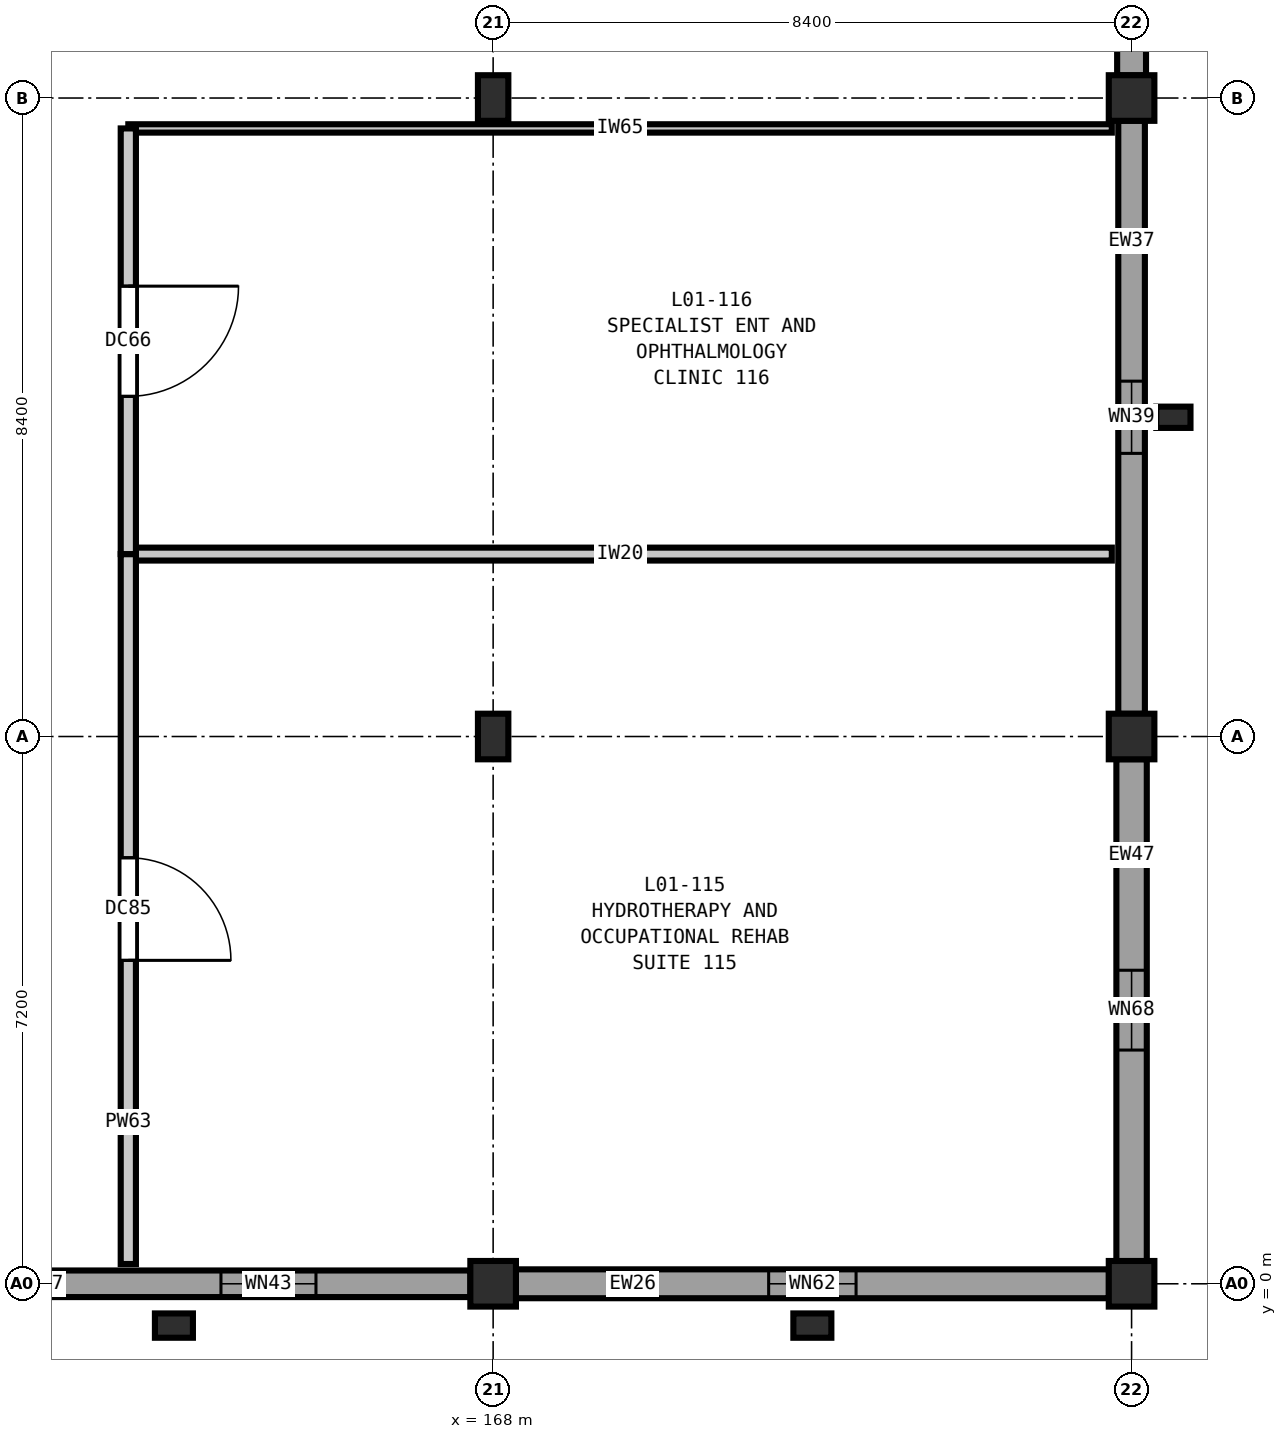
"""IFC4 building model, lengths in metres.
Left out: names, types, materials, properties, quantities, classifications, styles, units other than length and angle.
Written with IfcOpenShell. Run it as: python <this file> out.ifc"""

import sys

from ifc_helpers import new_model, si_unit, direction, frame, frame_2d, origin, origin_2d, place, context, subcontext, project, spatial, rectangle, extrude, element, fill, save


model = new_model("IFC4")
c1 = context("Model", 3, precision=1e-05, world=origin(), true_north=direction((0.0, 1.0)))
c2 = subcontext(c1, "Body", "Model", "MODEL_VIEW")
j1 = project(units=[si_unit("LENGTHUNIT", "METRE"), si_unit("PLANEANGLEUNIT", "RADIAN")], contexts=[c1])
p1 = place(None, origin())
s1 = spatial("IfcSite", under=j1, at=p1, CompositionType="ELEMENT")
p2 = place(p1, origin())
s2 = spatial("IfcBuilding", under=s1, at=p2, CompositionType="ELEMENT")
p3 = place(p2, frame((0.0, 0.0, 5.4)))
s3 = spatial("IfcBuildingStorey", under=s2, at=p3, CompositionType="ELEMENT", Elevation=5.4)
p4 = place(p3, frame((168.0, 0.0, 0.0), z_axis=(0.0, 0.0, 1.0), x_axis=(1.0, 0.0, 0.0)))
e1 = element("IfcColumn", 1, at=p4, inside=s3, PredefinedType="COLUMN", context=c2, shape_type="SweptSolid", body=[
    extrude(rectangle(XDim=0.6, YDim=0.6, at=origin_2d()), origin(), (0.0, 0.0, 1.0), 5.4),
])
for number, where, z_axis, x_axis in (
    (2, (168.0, 7.2, 0.0), (0.0, 0.0, 1.0), (1.0, 0.0, 0.0)),
    (3, (168.0, 15.6, 0.0), (0.0, 0.0, 1.0), (1.0, 0.0, 0.0)),
):
    element("IfcColumn", number, at=place(p3, frame(where, z_axis=z_axis, x_axis=x_axis)), inside=s3, PredefinedType="COLUMN", context=c2, shape_type="SweptSolid", body=[
        extrude(rectangle(XDim=0.4, YDim=0.6, at=origin_2d()), origin(), (0.0, 0.0, 1.0), 5.4),
    ])
for number, where, z_axis, x_axis in (
    (4, (176.4, 0.0, 0.0), (0.0, 0.0, 1.0), (1.0, 0.0, 0.0)),
    (5, (176.4, 7.2, 0.0), (0.0, 0.0, 1.0), (1.0, 0.0, 0.0)),
    (6, (176.4, 15.6, 0.0), (0.0, 0.0, 1.0), (1.0, 0.0, 0.0)),
):
    element("IfcColumn", number, at=place(p3, frame(where, z_axis=z_axis, x_axis=x_axis)), inside=s3, PredefinedType="COLUMN", context=c2, shape_type="SweptSolid", body=[
        extrude(rectangle(XDim=0.6, YDim=0.6, at=origin_2d()), origin(), (0.0, 0.0, 1.0), 5.4),
    ])
for number, where, z_axis, x_axis in (
    (7, (163.8, -0.55, 0.0), (0.0, 0.0, 1.0), (1.0, 0.0, 0.0)),
    (8, (172.2, -0.55, 0.0), (0.0, 0.0, 1.0), (1.0, 0.0, 0.0)),
):
    element("IfcColumn", number, at=place(p3, frame(where, z_axis=z_axis, x_axis=x_axis)), inside=s3, PredefinedType="PILASTER", context=c2, shape_type="SweptSolid", body=[
        extrude(rectangle(XDim=0.5, YDim=0.32, at=origin_2d()), origin(), (0.0, 0.0, 1.0), 5.4),
    ])
p5 = place(p3, frame((176.95, 11.4, 0.0), z_axis=(0.0, 0.0, 1.0), x_axis=(1.0, 0.0, 0.0)))
e9 = element("IfcColumn", 9, at=p5, inside=s3, PredefinedType="PILASTER", context=c2, shape_type="SweptSolid", body=[
    extrude(rectangle(XDim=0.45, YDim=0.28, at=origin_2d()), origin(), (0.0, 0.0, 1.0), 5.4),
])
p6 = place(p3, frame((176.4, 23.702, 0.0), z_axis=(0.0, 0.0, 1.0), x_axis=(0.0, -1.0, 0.0)))
e10 = element("IfcWall", 10, at=p6, inside=s3, PredefinedType="SOLIDWALL", context=c2, shape_type="SweptSolid", body=[
    extrude(rectangle(XDim=7.804, YDim=0.38, at=frame_2d((3.902, 0.0))), origin(), (0.0, 0.0, 1.0), 4.68),
])
p7 = place(p6, frame((3.477, 0.0, 0.9)))
e11 = element("IfcOpeningElement", 11, at=p7, cuts=e10, PredefinedType="OPENING", context=c2, shape_type="SweptSolid", body=[
    extrude(rectangle(XDim=0.85, YDim=1.4, at=frame_2d((0.425, 0.7))), frame((0.0, 0.2, 0.0), z_axis=(0.0, -1.0, 0.0), x_axis=(1.0, 0.0, 0.0)), (0.0, 0.0, 1.0), 0.4),
])
p8 = place(p3, frame((176.4, 15.302, 0.0), z_axis=(0.0, 0.0, 1.0), x_axis=(0.0, -1.0, 0.0)))
e12 = element("IfcWall", 12, at=p8, inside=s3, PredefinedType="SOLIDWALL", context=c2, shape_type="SweptSolid", body=[
    extrude(rectangle(XDim=7.804, YDim=0.35, at=frame_2d((3.902, 0.0))), origin(), (0.0, 0.0, 1.0), 4.68),
])
p9 = place(p8, frame((3.427, 0.0, 0.9)))
e13 = element("IfcOpeningElement", 13, at=p9, cuts=e12, PredefinedType="OPENING", context=c2, shape_type="SweptSolid", body=[
    extrude(rectangle(XDim=0.95, YDim=1.4, at=frame_2d((0.475, 0.7))), frame((0.0, 0.185, 0.0), z_axis=(0.0, -1.0, 0.0), x_axis=(1.0, 0.0, 0.0)), (0.0, 0.0, 1.0), 0.37),
])
p10 = place(p3, frame((176.4, 6.902, 0.0), z_axis=(0.0, 0.0, 1.0), x_axis=(0.0, -1.0, 0.0)))
e14 = element("IfcWall", 14, at=p10, inside=s3, PredefinedType="SOLIDWALL", context=c2, shape_type="SweptSolid", body=[
    extrude(rectangle(XDim=6.604, YDim=0.4, at=frame_2d((3.302, 0.0))), origin(), (0.0, 0.0, 1.0), 4.68),
])
p11 = place(p10, frame((2.777, 0.0, 0.9)))
e15 = element("IfcOpeningElement", 15, at=p11, cuts=e14, PredefinedType="OPENING", context=c2, shape_type="SweptSolid", body=[
    extrude(rectangle(XDim=1.05, YDim=1.4, at=frame_2d((0.525, 0.7))), frame((0.0, 0.21, 0.0), z_axis=(0.0, -1.0, 0.0), x_axis=(1.0, 0.0, 0.0)), (0.0, 0.0, 1.0), 0.42),
])
p12 = place(p3, frame((176.102, 0.0, 0.0), z_axis=(0.0, 0.0, 1.0), x_axis=(-1.0, 0.0, 0.0)))
e16 = element("IfcWall", 16, at=p12, inside=s3, PredefinedType="SOLIDWALL", context=c2, shape_type="SweptSolid", body=[
    extrude(rectangle(XDim=7.804, YDim=0.38, at=frame_2d((3.902, 0.0))), origin(), (0.0, 0.0, 1.0), 4.68),
])
p13 = place(p12, frame((3.327, 0.0, 0.9)))
e17 = element("IfcOpeningElement", 17, at=p13, cuts=e16, PredefinedType="OPENING", context=c2, shape_type="SweptSolid", body=[
    extrude(rectangle(XDim=1.15, YDim=1.4, at=frame_2d((0.575, 0.7))), frame((0.0, 0.2, 0.0), z_axis=(0.0, -1.0, 0.0), x_axis=(1.0, 0.0, 0.0)), (0.0, 0.0, 1.0), 0.4),
])
p14 = place(p3, frame((167.702, 0.0, 0.0), z_axis=(0.0, 0.0, 1.0), x_axis=(-1.0, 0.0, 0.0)))
e18 = element("IfcWall", 18, at=p14, inside=s3, PredefinedType="SOLIDWALL", context=c2, shape_type="SweptSolid", body=[
    extrude(rectangle(XDim=7.804, YDim=0.35, at=frame_2d((3.902, 0.0))), origin(), (0.0, 0.0, 1.0), 4.68),
])
p15 = place(p14, frame((2.033, 0.0, 0.9)))
e19 = element("IfcOpeningElement", 19, at=p15, cuts=e18, PredefinedType="OPENING", context=c2, shape_type="SweptSolid", body=[
    extrude(rectangle(XDim=1.25, YDim=1.4, at=frame_2d((0.625, 0.7))), frame((0.0, 0.185, 0.0), z_axis=(0.0, -1.0, 0.0), x_axis=(1.0, 0.0, 0.0)), (0.0, 0.0, 1.0), 0.37),
])
p16 = place(p3, frame((163.2, 9.6, 0.0), z_axis=(0.0, 0.0, 1.0), x_axis=(1.0, 0.0, 0.0)))
e20 = element("IfcWall", 20, at=p16, inside=s3, PredefinedType="PARTITIONING", context=c2, shape_type="SweptSolid", body=[
    extrude(rectangle(XDim=12.94, YDim=0.17, at=frame_2d((6.47, 0.0))), origin(), (0.0, 0.0, 1.0), 5.05),
])
p17 = place(p3, frame((163.2, 15.2, 0.0), z_axis=(0.0, 0.0, 1.0), x_axis=(1.0, 0.0, 0.0)))
e21 = element("IfcWall", 21, at=p17, inside=s3, PredefinedType="PARTITIONING", context=c2, shape_type="SweptSolid", body=[
    extrude(rectangle(XDim=12.94, YDim=0.11, at=frame_2d((6.47, 0.0))), origin(), (0.0, 0.0, 1.0), 5.05),
])
p18 = place(p3, frame((163.2, 0.26, 0.0), z_axis=(0.0, 0.0, 1.0), x_axis=(0.0, 1.0, 0.0)))
e22 = element("IfcWall", 22, at=p18, inside=s3, PredefinedType="PARTITIONING", context=c2, shape_type="SweptSolid", body=[
    extrude(rectangle(XDim=9.34, YDim=0.2, at=frame_2d((4.67, 0.0))), origin(), (0.0, 0.0, 1.0), 5.05),
])
p19 = place(p18, frame((3.995, 0.0, 0.0)))
e23 = element("IfcOpeningElement", 23, at=p19, cuts=e22, PredefinedType="OPENING", context=c2, shape_type="SweptSolid", body=[
    extrude(rectangle(XDim=1.35, YDim=2.2, at=frame_2d((0.675, 1.1))), frame((0.0, 0.11, 0.0), z_axis=(0.0, -1.0, 0.0), x_axis=(1.0, 0.0, 0.0)), (0.0, 0.0, 1.0), 0.22),
])
p20 = place(p3, frame((163.2, 9.6, 0.0), z_axis=(0.0, 0.0, 1.0), x_axis=(0.0, 1.0, 0.0)))
e24 = element("IfcWall", 24, at=p20, inside=s3, PredefinedType="PARTITIONING", context=c2, shape_type="SweptSolid", body=[
    extrude(rectangle(XDim=5.6, YDim=0.2, at=frame_2d((2.8, 0.0))), origin(), (0.0, 0.0, 1.0), 5.05),
])
p21 = place(p20, frame((2.075, 0.0, 0.0)))
e25 = element("IfcOpeningElement", 25, at=p21, cuts=e24, PredefinedType="OPENING", context=c2, shape_type="SweptSolid", body=[
    extrude(rectangle(XDim=1.45, YDim=2.25, at=frame_2d((0.725, 1.125))), frame((0.0, 0.11, 0.0), z_axis=(0.0, -1.0, 0.0), x_axis=(1.0, 0.0, 0.0)), (0.0, 0.0, 1.0), 0.22),
])
p22 = place(p9, origin())
e26 = element("IfcWindow", 26, at=p22, inside=s3, PartitioningType="SINGLE_PANEL", PredefinedType="WINDOW", context=c2, shape_type="SweptSolid", body=[
    extrude(rectangle(XDim=0.95, YDim=1.4, at=frame_2d((0.475, 0.7))), frame((0.0, 0.03, 0.0), z_axis=(0.0, -1.0, 0.0), x_axis=(1.0, 0.0, 0.0)), (0.0, 0.0, 1.0), 0.06),
])
fill(e13, e26)
p23 = place(p11, origin())
e27 = element("IfcWindow", 27, at=p23, inside=s3, PartitioningType="SINGLE_PANEL", PredefinedType="WINDOW", context=c2, shape_type="SweptSolid", body=[
    extrude(rectangle(XDim=1.05, YDim=1.4, at=frame_2d((0.525, 0.7))), frame((0.0, 0.03, 0.0), z_axis=(0.0, -1.0, 0.0), x_axis=(1.0, 0.0, 0.0)), (0.0, 0.0, 1.0), 0.06),
])
fill(e15, e27)
p24 = place(p13, origin())
e28 = element("IfcWindow", 28, at=p24, inside=s3, PartitioningType="SINGLE_PANEL", PredefinedType="WINDOW", context=c2, shape_type="SweptSolid", body=[
    extrude(rectangle(XDim=1.15, YDim=1.4, at=frame_2d((0.575, 0.7))), frame((0.0, 0.03, 0.0), z_axis=(0.0, -1.0, 0.0), x_axis=(1.0, 0.0, 0.0)), (0.0, 0.0, 1.0), 0.06),
])
fill(e17, e28)
p25 = place(p15, origin())
e29 = element("IfcWindow", 29, at=p25, inside=s3, PartitioningType="SINGLE_PANEL", PredefinedType="WINDOW", context=c2, shape_type="SweptSolid", body=[
    extrude(rectangle(XDim=1.25, YDim=1.4, at=frame_2d((0.625, 0.7))), frame((0.0, 0.03, 0.0), z_axis=(0.0, -1.0, 0.0), x_axis=(1.0, 0.0, 0.0)), (0.0, 0.0, 1.0), 0.06),
])
fill(e19, e29)
p26 = place(p19, frame((1.35, 0.0, 0.0), z_axis=(0.0, 0.0, 1.0), x_axis=(-1.0, 0.0, 0.0)))
e30 = element("IfcDoor", 30, at=p26, inside=s3, OperationType="SINGLE_SWING_RIGHT", PredefinedType="DOOR", context=c2, shape_type="SweptSolid", body=[
    extrude(rectangle(XDim=1.35, YDim=2.2, at=frame_2d((0.675, 1.1))), frame((0.0, 0.025, 0.0), z_axis=(0.0, -1.0, 0.0), x_axis=(1.0, 0.0, 0.0)), (0.0, 0.0, 1.0), 0.05),
])
fill(e23, e30)
p27 = place(p21, frame((1.45, 0.0, 0.0), z_axis=(0.0, 0.0, 1.0), x_axis=(-1.0, 0.0, 0.0)))
e31 = element("IfcDoor", 31, at=p27, inside=s3, OperationType="SINGLE_SWING_LEFT", PredefinedType="DOOR", context=c2, shape_type="SweptSolid", body=[
    extrude(rectangle(XDim=1.45, YDim=2.25, at=frame_2d((0.725, 1.125))), frame((0.0, 0.025, 0.0), z_axis=(0.0, -1.0, 0.0), x_axis=(1.0, 0.0, 0.0)), (0.0, 0.0, 1.0), 0.05),
])
fill(e25, e31)
save(model, sys.argv[1])
